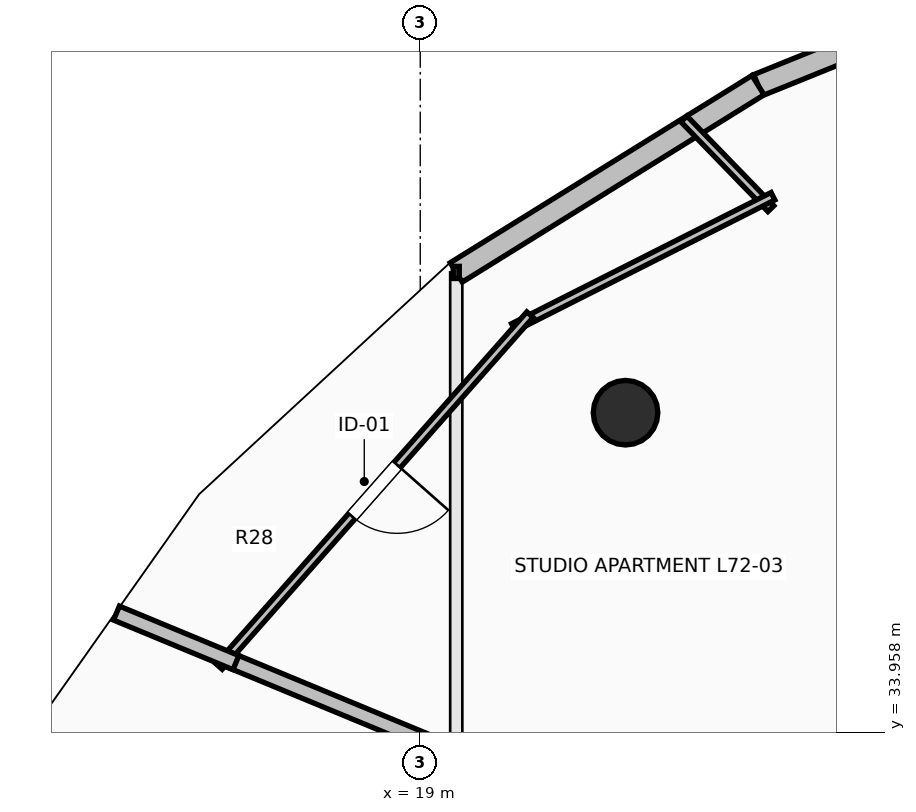
"""IFC4 building model, lengths in metres.
Left out: names, types, materials, properties, quantities, classifications, styles, units other than length and angle.
Written with IfcOpenShell. Run it as: python <this file> out.ifc"""

import sys

from ifc_helpers import new_model, si_unit, direction, frame, frame_2d, origin, origin_2d, place, context, subcontext, project, spatial, rectangle, circle, extrude, element, fill, save


model = new_model("IFC4")
c1 = context("Model", 3, precision=1e-05, world=origin(), true_north=direction((0.0, 1.0)))
c2 = subcontext(c1, "Body", "Model", "MODEL_VIEW")
j1 = project(units=[si_unit("LENGTHUNIT", "METRE"), si_unit("PLANEANGLEUNIT", "RADIAN")], contexts=[c1])
p1 = place(None, origin())
s1 = spatial("IfcSite", under=j1, at=p1, CompositionType="ELEMENT")
p2 = place(p1, origin())
s2 = spatial("IfcBuilding", under=s1, at=p2, CompositionType="ELEMENT")
p3 = place(p2, frame((0.0, 0.0, 266.2)))
s3 = spatial("IfcBuildingStorey", under=s2, at=p3, CompositionType="ELEMENT", Elevation=266.2)
p4 = place(p3, frame((21.701, 38.162, 0.0), z_axis=(0.0, 0.0, 1.0), x_axis=(-0.707106781187, 0.707106781187, 0.0)))
e1 = element("IfcColumn", 1, at=p4, inside=s3, PredefinedType="COLUMN", context=c2, shape_type="SweptSolid", body=[
    extrude(circle(Radius=0.425, at=origin_2d()), origin(), (0.0, 0.0, 1.0), 3.55),
])
p5 = place(p3, frame((27.974, 44.302, 0.0), z_axis=(0.0, 0.0, 1.0), x_axis=(-0.927147375511, -0.374696869594, 0.0)))
e2 = element("IfcWall", 2, at=p5, inside=s3, PredefinedType="STANDARD", context=c2, shape_type="SweptSolid", body=[
    extrude(rectangle(XDim=4.885, YDim=0.3, at=frame_2d((2.443, 0.0))), origin(), (0.0, 0.0, 1.0), 3.29),
])
p6 = place(p3, frame((23.444, 42.471, 0.0), z_axis=(0.0, 0.0, 1.0), x_axis=(-0.849702323036, -0.527262707032, 0.0)))
e3 = element("IfcWall", 3, at=p6, inside=s3, PredefinedType="STANDARD", context=c2, shape_type="SweptSolid", body=[
    extrude(rectangle(XDim=4.672, YDim=0.3, at=frame_2d((2.336, 0.0))), origin(), (0.0, 0.0, 1.0), 3.29),
])
p7 = place(p3, frame((22.469, 42.027, 0.0), z_axis=(0.0, 0.0, 1.0), x_axis=(0.695953252392, -0.718087091156, 0.0)))
e4 = element("IfcWall", 4, at=p7, inside=s3, PredefinedType="PARTITIONING", context=c2, shape_type="SweptSolid", body=[
    extrude(rectangle(XDim=1.644, YDim=0.11, at=frame_2d((0.822, 0.0))), origin(), (0.0, 0.0, 1.0), 3.29),
])
p8 = place(p3, frame((23.641, 41.01, 0.0), z_axis=(0.0, 0.0, 1.0), x_axis=(-0.892414796855, -0.451215946476, 0.0)))
e5 = element("IfcWall", 5, at=p8, inside=s3, PredefinedType="PARTITIONING", context=c2, shape_type="SweptSolid", body=[
    extrude(rectangle(XDim=3.826, YDim=0.11, at=frame_2d((1.913, 0.0))), origin(), (0.0, 0.0, 1.0), 3.29),
])
p9 = place(p3, frame((20.444, 39.452, 0.0), z_axis=(0.0, 0.0, 1.0), x_axis=(-0.662167862663, -0.749355537549, 0.0)))
e6 = element("IfcWall", 6, at=p9, inside=s3, PredefinedType="PARTITIONING", context=c2, shape_type="SweptSolid", body=[
    extrude(rectangle(XDim=6.177, YDim=0.11, at=frame_2d((3.089, 0.0))), origin(), (0.0, 0.0, 1.0), 3.29),
])
p10 = place(p9, frame((2.639, 0.0, 0.0)))
e7 = element("IfcOpeningElement", 7, at=p10, cuts=e6, PredefinedType="OPENING", context=c2, shape_type="SweptSolid", body=[
    extrude(rectangle(XDim=0.9, YDim=2.1, at=frame_2d((0.45, 1.05))), frame((0.0, 0.07, 0.0), z_axis=(0.0, -1.0, 0.0), x_axis=(1.0, 0.0, 0.0)), (0.0, 0.0, 1.0), 0.14),
])
p11 = place(p3, frame((16.446, 34.928, 0.0), z_axis=(0.0, 0.0, 1.0), x_axis=(0.923904292622, -0.3826236507, 0.0)))
e8 = element("IfcWall", 8, at=p11, inside=s3, PredefinedType="PARTITIONING", context=c2, shape_type="SweptSolid", body=[
    extrude(rectangle(XDim=3.648, YDim=0.2, at=frame_2d((1.824, 0.0))), origin(), (0.0, 0.0, 1.0), 2.874),
])
p12 = place(p3, frame((15.004, 35.526, 0.0), z_axis=(0.0, 0.0, 1.0), x_axis=(0.923843638485, -0.382770076719, 0.0)))
e9 = element("IfcWall", 9, at=p12, inside=s3, PredefinedType="PARTITIONING", context=c2, shape_type="SweptSolid", body=[
    extrude(rectangle(XDim=1.701, YDim=0.2, at=frame_2d((0.851, 0.0))), origin(), (0.0, 0.0, 1.0), 3.29),
])
p13 = place(p10, origin())
e10 = element("IfcDoor", 10, at=p13, inside=s3, OperationType="SINGLE_SWING_LEFT", PredefinedType="DOOR", context=c2, shape_type="SweptSolid", body=[
    extrude(rectangle(XDim=0.9, YDim=2.1, at=frame_2d((0.45, 1.05))), frame((0.0, 0.025, 0.0), z_axis=(0.0, -1.0, 0.0), x_axis=(1.0, 0.0, 0.0)), (0.0, 0.0, 1.0), 0.05),
])
fill(e7, e10)
save(model, sys.argv[1])
